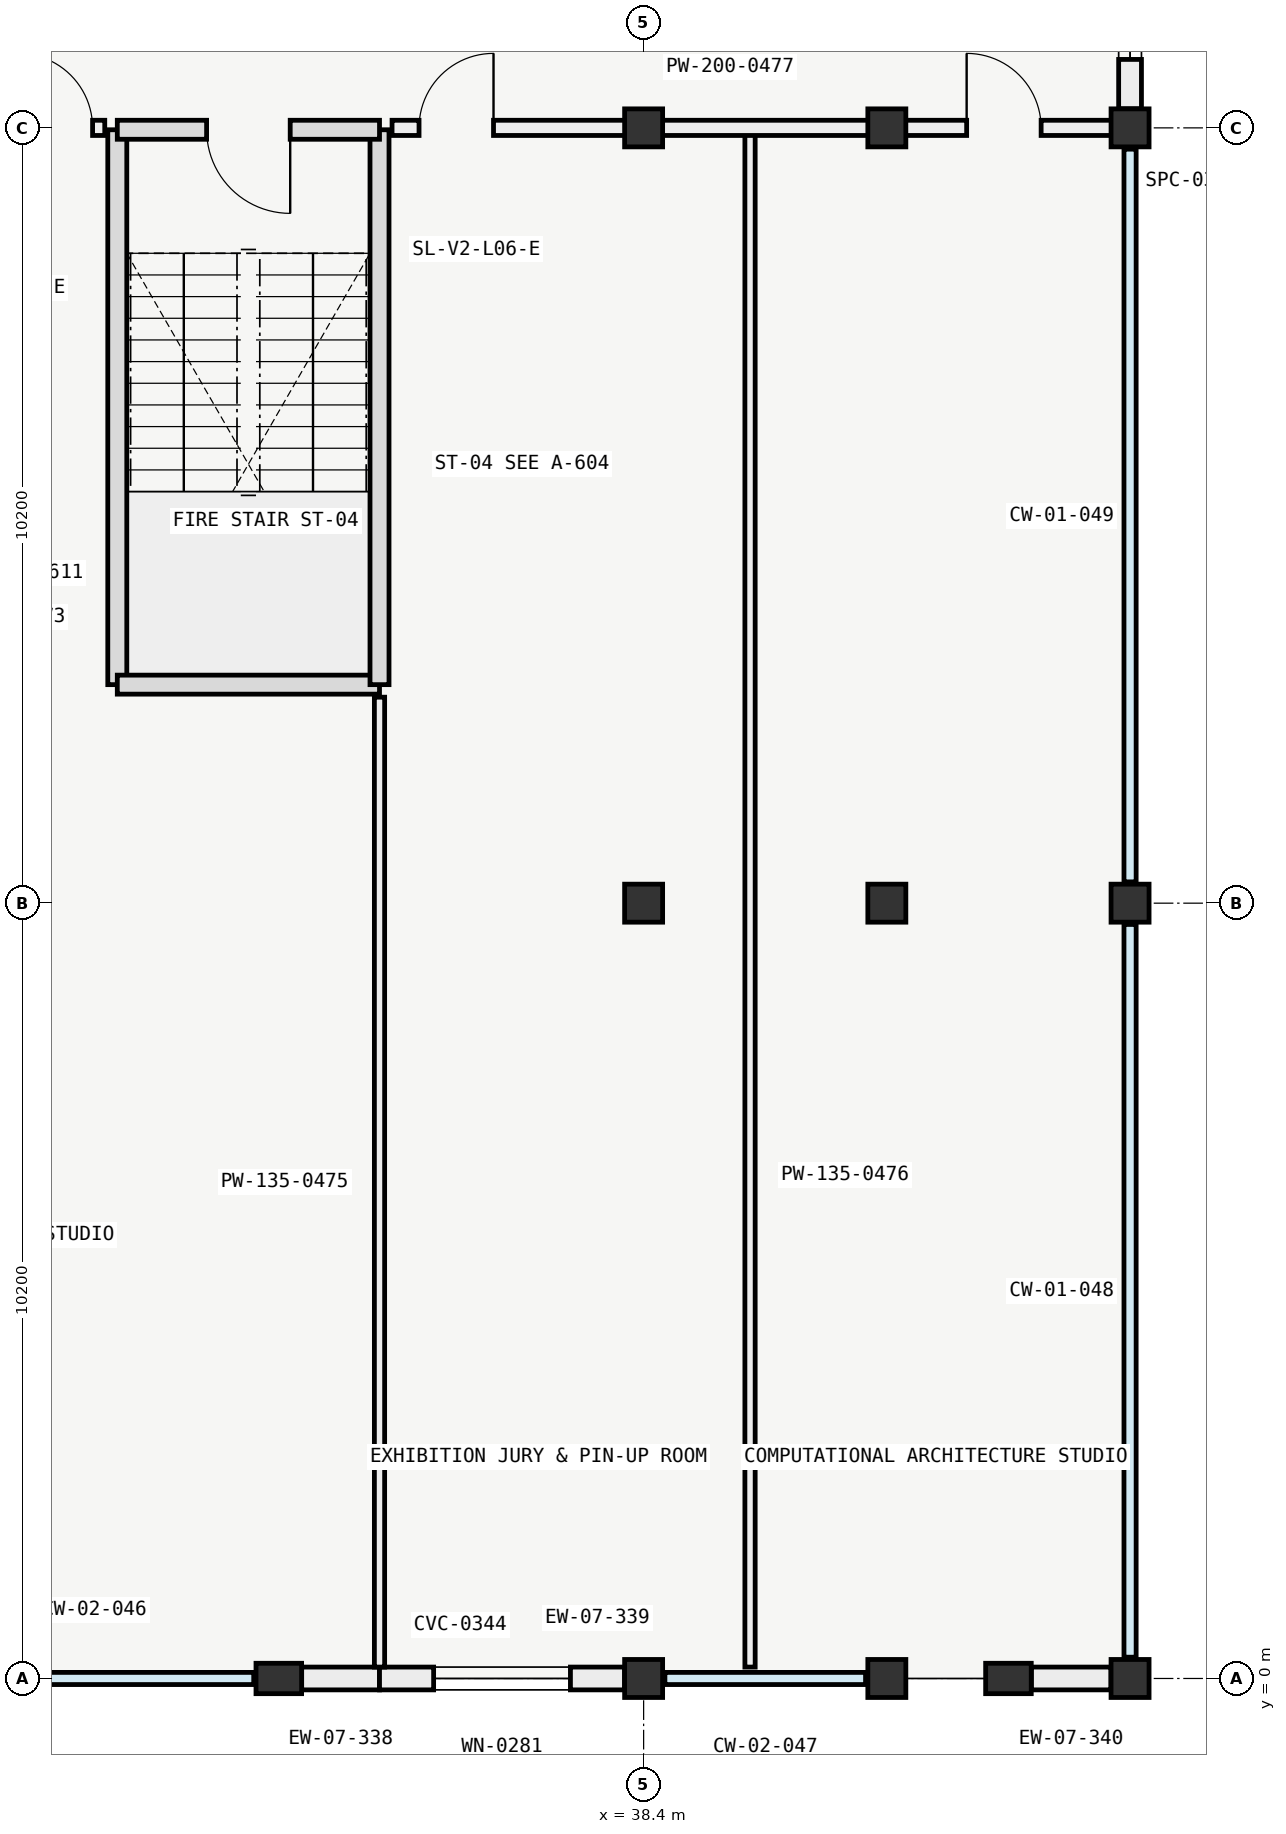
"""IFC4 building model, lengths in metres.
Left out: names, types, materials, properties, quantities, classifications, styles, units other than length and angle.
Written with IfcOpenShell. Run it as: python <this file> out.ifc"""

import sys

from ifc_helpers import new_model, si_unit, direction, frame, frame_2d, origin, origin_2d, place, context, subcontext, project, spatial, rectangle, extrude, element, fill, save


model = new_model("IFC4")
c1 = context("Model", 3, precision=1e-05, world=origin(), true_north=direction((0.0, 1.0)))
c2 = subcontext(c1, "Body", "Model", "MODEL_VIEW")
j1 = project(units=[si_unit("LENGTHUNIT", "METRE"), si_unit("PLANEANGLEUNIT", "RADIAN")], contexts=[c1])
p1 = place(None, origin())
s1 = spatial("IfcSite", under=j1, at=p1, CompositionType="ELEMENT")
p2 = place(p1, origin())
s2 = spatial("IfcBuilding", under=s1, at=p2, CompositionType="ELEMENT")
p3 = place(p2, frame((0.0, 0.0, 26.4)))
s3 = spatial("IfcBuildingStorey", under=s2, at=p3, CompositionType="ELEMENT", Elevation=26.4)
for number, where, z_axis, x_axis in (
    (1, (38.4, 0.0, 0.0), (0.0, 0.0, 1.0), (1.0, 0.0, 0.0)),
    (2, (38.4, 10.2, 0.0), (0.0, 0.0, 1.0), (1.0, 0.0, 0.0)),
    (3, (38.4, 20.4, 0.0), (0.0, 0.0, 1.0), (1.0, 0.0, 0.0)),
    (4, (41.6, 0.0, 0.0), (0.0, 0.0, 1.0), (1.0, 0.0, 0.0)),
    (5, (41.6, 10.2, 0.0), (0.0, 0.0, 1.0), (1.0, 0.0, 0.0)),
    (6, (41.6, 20.4, 0.0), (0.0, 0.0, 1.0), (1.0, 0.0, 0.0)),
    (7, (44.8, 0.0, 0.0), (0.0, 0.0, 1.0), (1.0, 0.0, 0.0)),
    (8, (44.8, 10.2, 0.0), (0.0, 0.0, 1.0), (1.0, 0.0, 0.0)),
    (9, (44.8, 20.4, 0.0), (0.0, 0.0, 1.0), (1.0, 0.0, 0.0)),
):
    element("IfcColumn", number, at=place(p3, frame(where, z_axis=z_axis, x_axis=x_axis)), inside=s3, PredefinedType="COLUMN", context=c2, shape_type="SweptSolid", body=[
        extrude(rectangle(XDim=0.5, YDim=0.5, at=origin_2d()), origin(), (0.0, 0.0, 1.0), 4.2),
    ])
for number, where, z_axis, x_axis in (
    (10, (33.6, 0.0, 0.0), (0.0, 0.0, 1.0), (0.0, 1.0, 0.0)),
    (11, (43.2, 0.0, 0.0), (0.0, 0.0, 1.0), (0.0, 1.0, 0.0)),
):
    element("IfcColumn", number, at=place(p3, frame(where, z_axis=z_axis, x_axis=x_axis)), inside=s3, PredefinedType="PILASTER", context=c2, shape_type="SweptSolid", body=[
        extrude(rectangle(XDim=0.4, YDim=0.6, at=origin_2d()), origin(), (0.0, 0.0, 1.0), 4.2),
    ])
p4 = place(p3, frame((34.925, 0.0, 0.0), z_axis=(0.0, 0.0, 1.0), x_axis=(-1.0, 0.0, 0.0)))
e12 = element("IfcWall", 12, at=p4, inside=s3, PredefinedType="SOLIDWALL", context=c2, shape_type="SweptSolid", body=[
    extrude(rectangle(XDim=1.024, YDim=0.3, at=frame_2d((0.512, 0.0))), origin(), (0.0, 0.0, 1.0), 3.25),
])
p5 = place(p3, frame((38.149, 0.0, 0.0), z_axis=(0.0, 0.0, 1.0), x_axis=(-1.0, 0.0, 0.0)))
e13 = element("IfcWall", 13, at=p5, inside=s3, PredefinedType="SOLIDWALL", context=c2, shape_type="SweptSolid", body=[
    extrude(rectangle(XDim=3.224, YDim=0.3, at=frame_2d((1.612, 0.0))), origin(), (0.0, 0.0, 1.0), 3.25),
])
p6 = place(p5, frame((0.712, 0.0, 0.8)))
e14 = element("IfcOpeningElement", 14, at=p6, cuts=e13, PredefinedType="OPENING", context=c2, shape_type="SweptSolid", body=[
    extrude(rectangle(XDim=1.8, YDim=2.1, at=frame_2d((0.9, 1.05))), frame((0.0, 0.16, 0.0), z_axis=(0.0, -1.0, 0.0), x_axis=(1.0, 0.0, 0.0)), (0.0, 0.0, 1.0), 0.32),
])
p7 = place(p3, frame((44.549, 0.0, 0.0), z_axis=(0.0, 0.0, 1.0), x_axis=(-1.0, 0.0, 0.0)))
e15 = element("IfcWall", 15, at=p7, inside=s3, PredefinedType="SOLIDWALL", context=c2, shape_type="SweptSolid", body=[
    extrude(rectangle(XDim=1.048, YDim=0.3, at=frame_2d((0.524, 0.0))), origin(), (0.0, 0.0, 1.0), 2.355),
])
p8 = place(p3, frame((44.8, 23.95, 0.0), z_axis=(0.0, 0.0, 1.0), x_axis=(0.0, -1.0, 0.0)))
e16 = element("IfcWall", 16, at=p8, inside=s3, PredefinedType="SOLIDWALL", context=c2, shape_type="SweptSolid", body=[
    extrude(rectangle(XDim=3.299, YDim=0.3, at=frame_2d((1.649, 0.0))), origin(), (0.0, 0.0, 1.0), 2.355),
])
p9 = place(p8, frame((0.649, 0.0, 0.75)))
e17 = element("IfcOpeningElement", 17, at=p9, cuts=e16, PredefinedType="OPENING", context=c2, shape_type="SweptSolid", body=[
    extrude(rectangle(XDim=2.0, YDim=1.35, at=frame_2d((1.0, 0.675))), frame((0.0, 0.16, 0.0), z_axis=(0.0, -1.0, 0.0), x_axis=(1.0, 0.0, 0.0)), (0.0, 0.0, 1.0), 0.32),
])
p10 = place(p3, frame((31.475, 20.375, 0.0), z_axis=(0.0, 0.0, 1.0), x_axis=(0.0, -1.0, 0.0)))
e18 = element("IfcWall", 18, at=p10, inside=s3, PredefinedType="SOLIDWALL", context=c2, shape_type="SweptSolid", body=[
    extrude(rectangle(XDim=7.3, YDim=0.25, at=frame_2d((3.65, 0.0))), origin(), (0.0, 0.0, 1.0), 3.975),
])
p11 = place(p3, frame((31.475, 13.075, 0.0), z_axis=(0.0, 0.0, 1.0), x_axis=(1.0, 0.0, 0.0)))
e19 = element("IfcWall", 19, at=p11, inside=s3, PredefinedType="SOLIDWALL", context=c2, shape_type="SweptSolid", body=[
    extrude(rectangle(XDim=3.45, YDim=0.25, at=frame_2d((1.725, 0.0))), origin(), (0.0, 0.0, 1.0), 3.975),
])
p12 = place(p3, frame((34.925, 13.075, 0.0), z_axis=(0.0, 0.0, 1.0), x_axis=(0.0, 1.0, 0.0)))
e20 = element("IfcWall", 20, at=p12, inside=s3, PredefinedType="SOLIDWALL", context=c2, shape_type="SweptSolid", body=[
    extrude(rectangle(XDim=7.3, YDim=0.25, at=frame_2d((3.65, 0.0))), origin(), (0.0, 0.0, 1.0), 3.975),
])
p13 = place(p3, frame((34.925, 20.375, 0.0), z_axis=(0.0, 0.0, 1.0), x_axis=(-1.0, 0.0, 0.0)))
e21 = element("IfcWall", 21, at=p13, inside=s3, PredefinedType="SOLIDWALL", context=c2, shape_type="SweptSolid", body=[
    extrude(rectangle(XDim=3.45, YDim=0.25, at=frame_2d((1.725, 0.0))), origin(), (0.0, 0.0, 1.0), 3.975),
])
p14 = place(p13, frame((1.175, 0.0, 0.0)))
e22 = element("IfcOpeningElement", 22, at=p14, cuts=e21, PredefinedType="OPENING", context=c2, shape_type="SweptSolid", body=[
    extrude(rectangle(XDim=1.1, YDim=2.2, at=frame_2d((0.55, 1.1))), frame((0.0, 0.135, 0.0), z_axis=(0.0, -1.0, 0.0), x_axis=(1.0, 0.0, 0.0)), (0.0, 0.0, 1.0), 0.27),
])
p15 = place(p3, frame((28.2, 20.4, 0.0), z_axis=(0.0, 0.0, 1.0), x_axis=(1.0, 0.0, 0.0)))
e23 = element("IfcWall", 23, at=p15, inside=s3, PredefinedType="PARTITIONING", context=c2, shape_type="SweptSolid", body=[
    extrude(rectangle(XDim=3.11, YDim=0.2, at=frame_2d((1.555, 0.0))), origin(), (0.0, 0.0, 1.0), 3.305),
])
p16 = place(p15, frame((1.97, 0.0, 0.0)))
e24 = element("IfcOpeningElement", 24, at=p16, cuts=e23, PredefinedType="OPENING", context=c2, shape_type="SweptSolid", body=[
    extrude(rectangle(XDim=0.98, YDim=2.15, at=frame_2d((0.49, 1.075))), frame((0.0, 0.11, 0.0), z_axis=(0.0, -1.0, 0.0), x_axis=(1.0, 0.0, 0.0)), (0.0, 0.0, 1.0), 0.22),
])
p17 = place(p3, frame((34.925, 0.15, 0.0), z_axis=(0.0, 0.0, 1.0), x_axis=(0.0, 1.0, 0.0)))
e25 = element("IfcWall", 25, at=p17, inside=s3, PredefinedType="PARTITIONING", context=c2, shape_type="SweptSolid", body=[
    extrude(rectangle(XDim=12.76, YDim=0.135, at=frame_2d((6.38, 0.0))), origin(), (0.0, 0.0, 1.0), 3.405),
])
p18 = place(p3, frame((39.8, 0.15, 0.0), z_axis=(0.0, 0.0, 1.0), x_axis=(0.0, 1.0, 0.0)))
e26 = element("IfcWall", 26, at=p18, inside=s3, PredefinedType="PARTITIONING", context=c2, shape_type="SweptSolid", body=[
    extrude(rectangle(XDim=20.25, YDim=0.135, at=frame_2d((10.125, 0.0))), origin(), (0.0, 0.0, 1.0), 2.355),
])
p19 = place(p3, frame((35.09, 20.4, 0.0), z_axis=(0.0, 0.0, 1.0), x_axis=(1.0, 0.0, 0.0)))
e27 = element("IfcWall", 27, at=p19, inside=s3, PredefinedType="PARTITIONING", context=c2, shape_type="SweptSolid", body=[
    extrude(rectangle(XDim=9.56, YDim=0.2, at=frame_2d((4.78, 0.0))), origin(), (0.0, 0.0, 1.0), 2.355),
])
p20 = place(p19, frame((0.355, 0.0, 0.0)))
e28 = element("IfcOpeningElement", 28, at=p20, cuts=e27, PredefinedType="OPENING", context=c2, shape_type="SweptSolid", body=[
    extrude(rectangle(XDim=0.98, YDim=2.15, at=frame_2d((0.49, 1.075))), frame((0.0, 0.11, 0.0), z_axis=(0.0, -1.0, 0.0), x_axis=(1.0, 0.0, 0.0)), (0.0, 0.0, 1.0), 0.22),
])
p21 = place(p19, frame((7.56, 0.0, 0.0)))
e29 = element("IfcOpeningElement", 29, at=p21, cuts=e27, PredefinedType="OPENING", context=c2, shape_type="SweptSolid", body=[
    extrude(rectangle(XDim=0.98, YDim=2.15, at=frame_2d((0.49, 1.075))), frame((0.0, 0.11, 0.0), z_axis=(0.0, -1.0, 0.0), x_axis=(1.0, 0.0, 0.0)), (0.0, 0.0, 1.0), 0.22),
])
p22 = place(p6, origin())
e30 = element("IfcWindow", 30, at=p22, inside=s3, PartitioningType="SINGLE_PANEL", PredefinedType="WINDOW", context=c2, shape_type="SweptSolid", body=[
    extrude(rectangle(XDim=1.8, YDim=2.1, at=frame_2d((0.9, 1.05))), frame((0.0, 0.03, 0.0), z_axis=(0.0, -1.0, 0.0), x_axis=(1.0, 0.0, 0.0)), (0.0, 0.0, 1.0), 0.06),
])
fill(e14, e30)
p23 = place(p9, origin())
e31 = element("IfcWindow", 31, at=p23, inside=s3, PartitioningType="SINGLE_PANEL", PredefinedType="WINDOW", context=c2, shape_type="SweptSolid", body=[
    extrude(rectangle(XDim=2.0, YDim=1.35, at=frame_2d((1.0, 0.675))), frame((0.0, 0.03, 0.0), z_axis=(0.0, -1.0, 0.0), x_axis=(1.0, 0.0, 0.0)), (0.0, 0.0, 1.0), 0.06),
])
fill(e17, e31)
p24 = place(p14, origin())
e32 = element("IfcDoor", 32, at=p24, inside=s3, OperationType="SINGLE_SWING_LEFT", PredefinedType="DOOR", context=c2, shape_type="SweptSolid", body=[
    extrude(rectangle(XDim=1.1, YDim=2.2, at=frame_2d((0.55, 1.1))), frame((0.0, 0.025, 0.0), z_axis=(0.0, -1.0, 0.0), x_axis=(1.0, 0.0, 0.0)), (0.0, 0.0, 1.0), 0.05),
])
fill(e22, e32)
p25 = place(p16, origin())
e33 = element("IfcDoor", 33, at=p25, inside=s3, OperationType="SINGLE_SWING_LEFT", PredefinedType="DOOR", context=c2, shape_type="SweptSolid", body=[
    extrude(rectangle(XDim=0.98, YDim=2.15, at=frame_2d((0.49, 1.075))), frame((0.0, 0.025, 0.0), z_axis=(0.0, -1.0, 0.0), x_axis=(1.0, 0.0, 0.0)), (0.0, 0.0, 1.0), 0.05),
])
fill(e24, e33)
p26 = place(p20, origin())
e34 = element("IfcDoor", 34, at=p26, inside=s3, OperationType="SINGLE_SWING_RIGHT", PredefinedType="DOOR", context=c2, shape_type="SweptSolid", body=[
    extrude(rectangle(XDim=0.98, YDim=2.15, at=frame_2d((0.49, 1.075))), frame((0.0, 0.025, 0.0), z_axis=(0.0, -1.0, 0.0), x_axis=(1.0, 0.0, 0.0)), (0.0, 0.0, 1.0), 0.05),
])
fill(e28, e34)
p27 = place(p21, origin())
e35 = element("IfcDoor", 35, at=p27, inside=s3, OperationType="SINGLE_SWING_LEFT", PredefinedType="DOOR", context=c2, shape_type="SweptSolid", body=[
    extrude(rectangle(XDim=0.98, YDim=2.15, at=frame_2d((0.49, 1.075))), frame((0.0, 0.025, 0.0), z_axis=(0.0, -1.0, 0.0), x_axis=(1.0, 0.0, 0.0)), (0.0, 0.0, 1.0), 0.05),
])
fill(e29, e35)
save(model, sys.argv[1])
